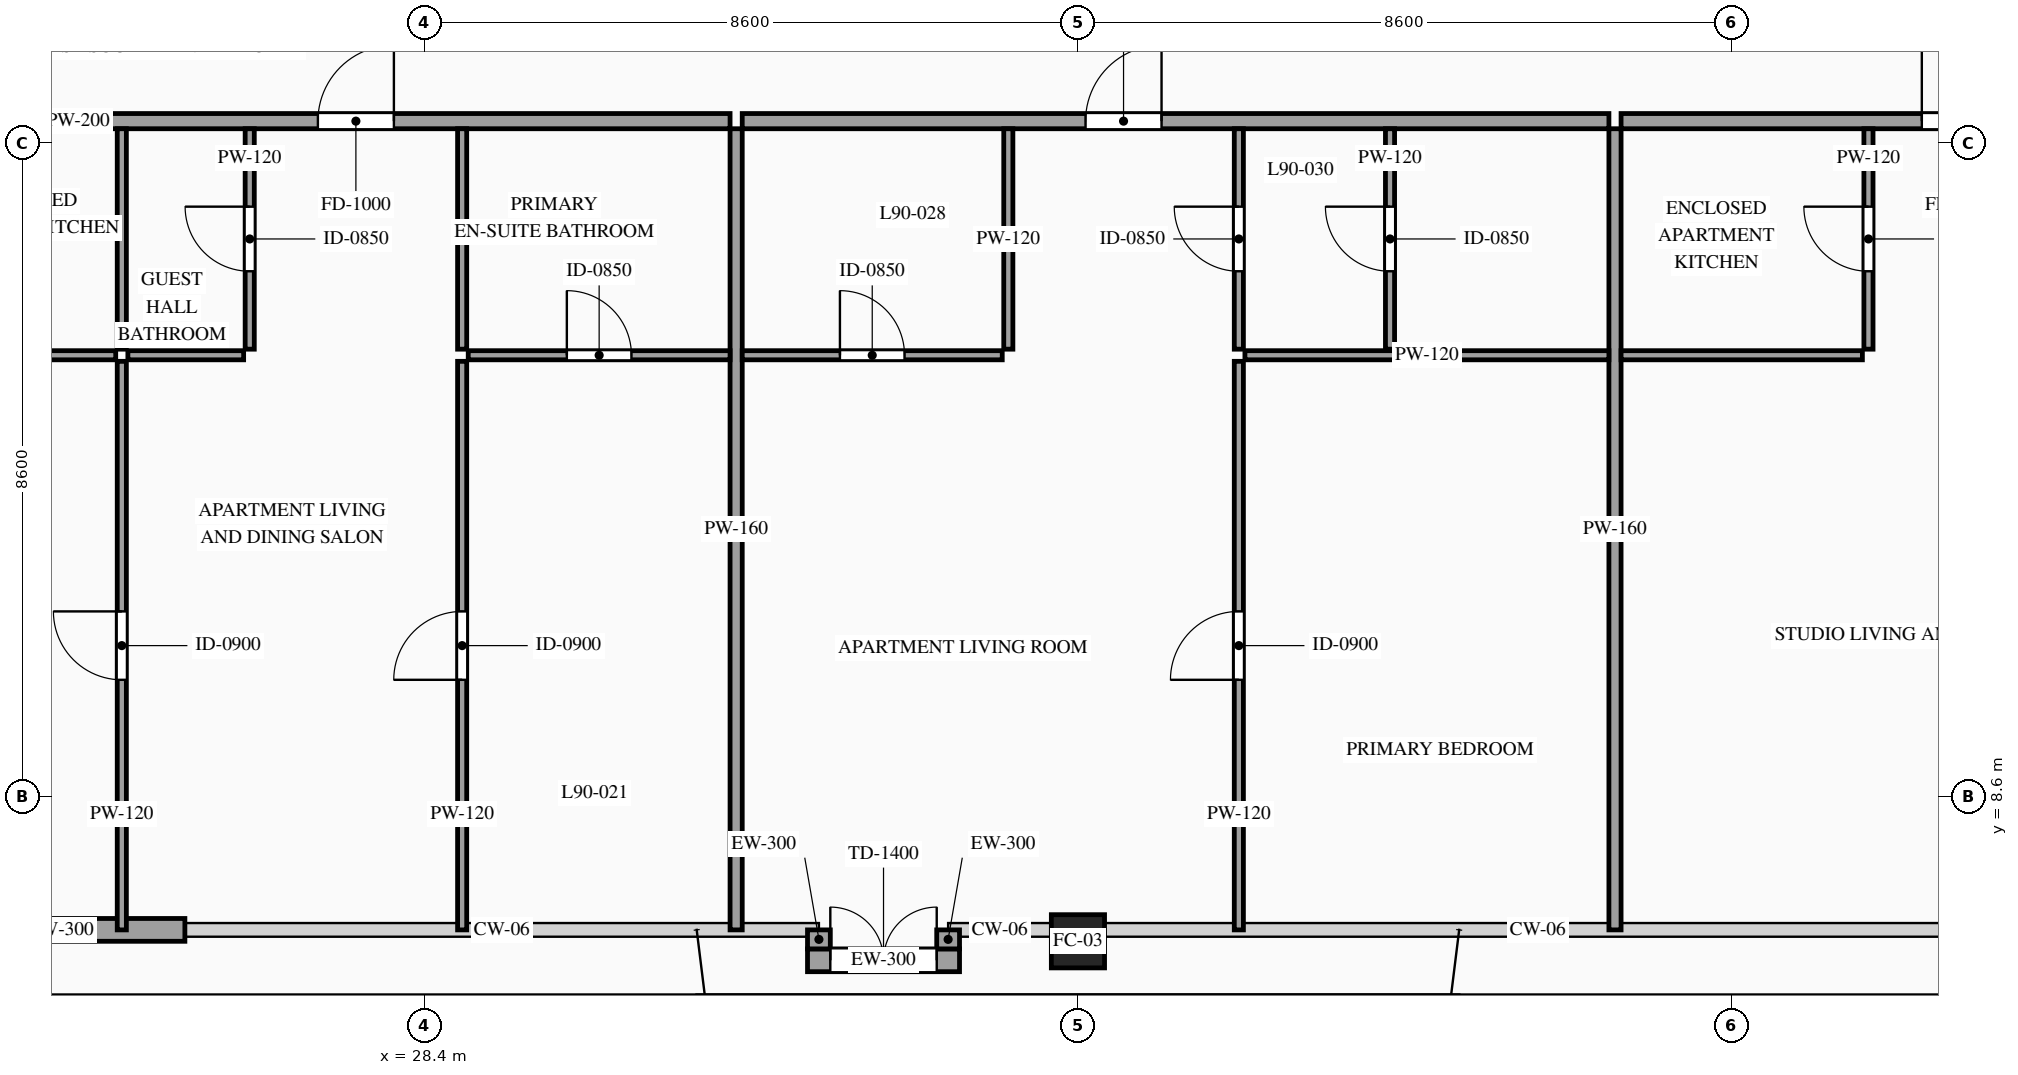
"""IFC4 building model, lengths in metres.
Left out: names, types, materials, properties, quantities, classifications, styles, units other than length and angle.
Written with IfcOpenShell. Run it as: python <this file> out.ifc"""

import sys

from ifc_helpers import new_model, si_unit, direction, frame, frame_2d, origin, origin_2d, place, context, subcontext, project, spatial, rectangle, hollow_rectangle, extrude, source, transform, mapped, element, fill, save


model = new_model("IFC4")
c1 = context("Model", 3, precision=1e-05, world=origin(), true_north=direction((0.0, 1.0)))
c2 = subcontext(c1, "Body", "Model", "MODEL_VIEW")
j1 = project(units=[si_unit("LENGTHUNIT", "METRE"), si_unit("PLANEANGLEUNIT", "RADIAN")], contexts=[c1])
p1 = place(None, origin())
s1 = spatial("IfcSite", under=j1, at=p1, CompositionType="ELEMENT")
p2 = place(p1, origin())
s2 = spatial("IfcBuilding", under=s1, at=p2, CompositionType="ELEMENT")
p3 = place(p2, frame((0.0, 0.0, 335.7)))
s3 = spatial("IfcBuildingStorey", under=s2, at=p3, CompositionType="ELEMENT", Elevation=335.7)
m1 = source(origin(), c2, "Body", "SweptSolid", [
    extrude(hollow_rectangle(XDim=0.7, YDim=0.7, WallThickness=0.032, at=origin_2d()), origin(), (0.0, 0.0, 1.0), 3.5),
])
p4 = place(p3, frame((37.0, 6.7, 0.0), z_axis=(0.0, 0.0, 1.0), x_axis=(1.0, 0.0, 0.0)))
e1 = element("IfcColumn", 1, at=p4, inside=s3, PredefinedType="COLUMN", context=c2, shape_type="MappedRepresentation", body=[
    mapped(m1, transform((0.0, 0.0, 0.0), scale=1.0)),
])
m2 = source(origin(), c2, "Body", "SweptSolid", [
    extrude(rectangle(XDim=3.25, YDim=0.3, at=frame_2d((1.625, 0.0))), origin(), (0.0, 0.0, 1.0), 2.865),
])
p5 = place(p3, frame((22.0, 6.85, 0.0), z_axis=(0.0, 0.0, 1.0), x_axis=(1.0, 0.0, 0.0)))
e2 = element("IfcWall", 2, at=p5, inside=s3, PredefinedType="SOLIDWALL", context=c2, shape_type="MappedRepresentation", body=[
    mapped(m2, transform((0.0, 0.0, 0.0), scale=1.0)),
])
p6 = place(p3, frame((33.442, 6.45, 0.0), z_axis=(0.0, 0.0, 1.0), x_axis=(1.0, 0.0, 0.0)))
e3 = element("IfcWall", 3, at=p6, inside=s3, PredefinedType="SOLIDWALL", context=c2, shape_type="SweptSolid", body=[
    extrude(rectangle(XDim=2.0, YDim=0.3, at=frame_2d((1.0, 0.0))), origin(), (0.0, 0.0, 1.0), 2.865),
])
p7 = place(p6, frame((0.3, 0.0, 0.0)))
e4 = element("IfcOpeningElement", 4, at=p7, cuts=e3, PredefinedType="OPENING", context=c2, shape_type="SweptSolid", body=[
    extrude(rectangle(XDim=1.4, YDim=2.3, at=frame_2d((0.7, 1.15))), frame((0.0, 0.165, 0.0), z_axis=(0.0, -1.0, 0.0), x_axis=(1.0, 0.0, 0.0)), (0.0, 0.0, 1.0), 0.33),
])
m3 = source(origin(), c2, "Body", "SweptSolid", [
    extrude(rectangle(XDim=0.25, YDim=0.3, at=frame_2d((0.125, 0.0))), origin(), (0.0, 0.0, 1.0), 3.26),
])
for number, where, z_axis, x_axis in (
    (5, (33.592, 6.85, 0.0), (0.0, 0.0, 1.0), (0.0, -1.0, 0.0)),
    (6, (35.292, 6.6, 0.0), (0.0, 0.0, 1.0), (0.0, 1.0, 0.0)),
):
    element("IfcWall", number, at=place(p3, frame(where, z_axis=z_axis, x_axis=x_axis)), inside=s3, PredefinedType="SOLIDWALL", context=c2, shape_type="MappedRepresentation", body=[
        mapped(m3, transform((0.0, 0.0, 0.0), scale=1.0)),
    ])
p8 = place(p3, frame((20.94, 17.49, 0.0), z_axis=(0.0, 0.0, 1.0), x_axis=(1.0, 0.0, 0.0)))
e7 = element("IfcWall", 7, at=p8, inside=s3, PredefinedType="PARTITIONING", context=c2, shape_type="SweptSolid", body=[
    extrude(rectangle(XDim=11.483, YDim=0.2, at=frame_2d((5.742, 0.0))), origin(), (0.0, 0.0, 1.0), 3.26),
])
p9 = place(p8, frame((6.06, 0.0, 0.0)))
e8 = element("IfcOpeningElement", 8, at=p9, cuts=e7, PredefinedType="OPENING", context=c2, shape_type="SweptSolid", body=[
    extrude(rectangle(XDim=1.0, YDim=2.2, at=frame_2d((0.5, 1.1))), frame((0.0, 0.115, 0.0), z_axis=(0.0, -1.0, 0.0), x_axis=(1.0, 0.0, 0.0)), (0.0, 0.0, 1.0), 0.23),
])
m4 = source(origin(), c2, "Body", "SweptSolid", [
    extrude(rectangle(XDim=10.54, YDim=0.16, at=frame_2d((5.27, 0.0))), origin(), (0.0, 0.0, 1.0), 3.26),
])
p10 = place(p3, frame((32.503, 6.85, 0.0), z_axis=(0.0, 0.0, 1.0), x_axis=(0.0, 1.0, 0.0)))
e9 = element("IfcWall", 9, at=p10, inside=s3, PredefinedType="PARTITIONING", context=c2, shape_type="MappedRepresentation", body=[
    mapped(m4, transform((0.0, 0.0, 0.0), scale=1.0)),
])
p11 = place(p3, frame((20.94, 14.41, 0.0), z_axis=(0.0, 0.0, 1.0), x_axis=(1.0, 0.0, 0.0)))
e10 = element("IfcWall", 10, at=p11, inside=s3, PredefinedType="PARTITIONING", context=c2, shape_type="SweptSolid", body=[
    extrude(rectangle(XDim=3.4, YDim=0.12, at=frame_2d((1.7, 0.0))), origin(), (0.0, 0.0, 1.0), 3.26),
])
p12 = place(p11, frame((1.275, 0.0, 0.0)))
e11 = element("IfcOpeningElement", 11, at=p12, cuts=e10, PredefinedType="OPENING", context=c2, shape_type="SweptSolid", body=[
    extrude(rectangle(XDim=0.85, YDim=2.1, at=frame_2d((0.425, 1.05))), frame((0.0, 0.075, 0.0), z_axis=(0.0, -1.0, 0.0), x_axis=(1.0, 0.0, 0.0)), (0.0, 0.0, 1.0), 0.15),
])
m5 = source(origin(), c2, "Body", "SweptSolid", [
    extrude(rectangle(XDim=2.9, YDim=0.12, at=frame_2d((1.45, 0.0))), origin(), (0.0, 0.0, 1.0), 3.26),
])
p13 = place(p3, frame((24.42, 14.49, 0.0), z_axis=(0.0, 0.0, 1.0), x_axis=(0.0, 1.0, 0.0)))
e12 = element("IfcWall", 12, at=p13, inside=s3, PredefinedType="PARTITIONING", context=c2, shape_type="MappedRepresentation", body=[
    mapped(m5, transform((0.0, 0.0, 0.0), scale=1.0)),
])
m6 = source(origin(), c2, "Body", "SweptSolid", [
    extrude(rectangle(XDim=1.523, YDim=0.12, at=frame_2d((0.761, 0.0))), origin(), (0.0, 0.0, 1.0), 3.26),
])
p14 = place(p3, frame((24.5, 14.41, 0.0), z_axis=(0.0, 0.0, 1.0), x_axis=(1.0, 0.0, 0.0)))
e13 = element("IfcWall", 13, at=p14, inside=s3, PredefinedType="PARTITIONING", context=c2, shape_type="MappedRepresentation", body=[
    mapped(m6, transform((0.0, 0.0, 0.0), scale=1.0)),
])
p15 = place(p3, frame((26.103, 14.49, 0.0), z_axis=(0.0, 0.0, 1.0), x_axis=(0.0, 1.0, 0.0)))
e14 = element("IfcWall", 14, at=p15, inside=s3, PredefinedType="PARTITIONING", context=c2, shape_type="SweptSolid", body=[
    extrude(rectangle(XDim=2.9, YDim=0.12, at=frame_2d((1.45, 0.0))), origin(), (0.0, 0.0, 1.0), 3.26),
])
p16 = place(p15, frame((1.025, 0.0, 0.0)))
e15 = element("IfcOpeningElement", 15, at=p16, cuts=e14, PredefinedType="OPENING", context=c2, shape_type="SweptSolid", body=[
    extrude(rectangle(XDim=0.85, YDim=2.1, at=frame_2d((0.425, 1.05))), frame((0.0, 0.075, 0.0), z_axis=(0.0, -1.0, 0.0), x_axis=(1.0, 0.0, 0.0)), (0.0, 0.0, 1.0), 0.15),
])
p17 = place(p3, frame((28.978, 14.41, 0.0), z_axis=(0.0, 0.0, 1.0), x_axis=(1.0, 0.0, 0.0)))
e16 = element("IfcWall", 16, at=p17, inside=s3, PredefinedType="PARTITIONING", context=c2, shape_type="SweptSolid", body=[
    extrude(rectangle(XDim=3.445, YDim=0.12, at=frame_2d((1.723, 0.0))), origin(), (0.0, 0.0, 1.0), 3.26),
])
p18 = place(p17, frame((1.298, 0.0, 0.0)))
e17 = element("IfcOpeningElement", 17, at=p18, cuts=e16, PredefinedType="OPENING", context=c2, shape_type="SweptSolid", body=[
    extrude(rectangle(XDim=0.85, YDim=2.1, at=frame_2d((0.425, 1.05))), frame((0.0, 0.075, 0.0), z_axis=(0.0, -1.0, 0.0), x_axis=(1.0, 0.0, 0.0)), (0.0, 0.0, 1.0), 0.15),
])
p19 = place(p3, frame((28.898, 14.49, 0.0), z_axis=(0.0, 0.0, 1.0), x_axis=(0.0, 1.0, 0.0)))
e18 = element("IfcWall", 18, at=p19, inside=s3, PredefinedType="PARTITIONING", context=c2, shape_type="MappedRepresentation", body=[
    mapped(m5, transform((0.0, 0.0, 0.0), scale=1.0)),
])
p20 = place(p3, frame((24.42, 6.85, 0.0), z_axis=(0.0, 0.0, 1.0), x_axis=(0.0, 1.0, 0.0)))
e19 = element("IfcWall", 19, at=p20, inside=s3, PredefinedType="PARTITIONING", context=c2, shape_type="SweptSolid", body=[
    extrude(rectangle(XDim=7.48, YDim=0.12, at=frame_2d((3.74, 0.0))), origin(), (0.0, 0.0, 1.0), 3.26),
])
p21 = place(p20, frame((3.29, 0.0, 0.0)))
e20 = element("IfcOpeningElement", 20, at=p21, cuts=e19, PredefinedType="OPENING", context=c2, shape_type="SweptSolid", body=[
    extrude(rectangle(XDim=0.9, YDim=2.15, at=frame_2d((0.45, 1.075))), frame((0.0, 0.075, 0.0), z_axis=(0.0, -1.0, 0.0), x_axis=(1.0, 0.0, 0.0)), (0.0, 0.0, 1.0), 0.15),
])
p22 = place(p3, frame((28.898, 6.85, 0.0), z_axis=(0.0, 0.0, 1.0), x_axis=(0.0, 1.0, 0.0)))
e21 = element("IfcWall", 21, at=p22, inside=s3, PredefinedType="PARTITIONING", context=c2, shape_type="SweptSolid", body=[
    extrude(rectangle(XDim=7.48, YDim=0.12, at=frame_2d((3.74, 0.0))), origin(), (0.0, 0.0, 1.0), 3.26),
])
p23 = place(p22, frame((3.29, 0.0, 0.0)))
e22 = element("IfcOpeningElement", 22, at=p23, cuts=e21, PredefinedType="OPENING", context=c2, shape_type="SweptSolid", body=[
    extrude(rectangle(XDim=0.9, YDim=2.15, at=frame_2d((0.45, 1.075))), frame((0.0, 0.075, 0.0), z_axis=(0.0, -1.0, 0.0), x_axis=(1.0, 0.0, 0.0)), (0.0, 0.0, 1.0), 0.15),
])
p24 = place(p3, frame((32.583, 17.49, 0.0), z_axis=(0.0, 0.0, 1.0), x_axis=(1.0, 0.0, 0.0)))
e23 = element("IfcWall", 23, at=p24, inside=s3, PredefinedType="PARTITIONING", context=c2, shape_type="SweptSolid", body=[
    extrude(rectangle(XDim=11.403, YDim=0.2, at=frame_2d((5.702, 0.0))), origin(), (0.0, 0.0, 1.0), 3.26),
])
p25 = place(p24, frame((4.517, 0.0, 0.0)))
e24 = element("IfcOpeningElement", 24, at=p25, cuts=e23, PredefinedType="OPENING", context=c2, shape_type="SweptSolid", body=[
    extrude(rectangle(XDim=1.0, YDim=2.2, at=frame_2d((0.5, 1.1))), frame((0.0, 0.115, 0.0), z_axis=(0.0, -1.0, 0.0), x_axis=(1.0, 0.0, 0.0)), (0.0, 0.0, 1.0), 0.23),
])
p26 = place(p3, frame((44.066, 6.85, 0.0), z_axis=(0.0, 0.0, 1.0), x_axis=(0.0, 1.0, 0.0)))
e25 = element("IfcWall", 25, at=p26, inside=s3, PredefinedType="PARTITIONING", context=c2, shape_type="MappedRepresentation", body=[
    mapped(m4, transform((0.0, 0.0, 0.0), scale=1.0)),
])
p27 = place(p3, frame((32.583, 14.41, 0.0), z_axis=(0.0, 0.0, 1.0), x_axis=(1.0, 0.0, 0.0)))
e26 = element("IfcWall", 26, at=p27, inside=s3, PredefinedType="PARTITIONING", context=c2, shape_type="SweptSolid", body=[
    extrude(rectangle(XDim=3.421, YDim=0.12, at=frame_2d((1.71, 0.0))), origin(), (0.0, 0.0, 1.0), 3.26),
])
p28 = place(p27, frame((1.285, 0.0, 0.0)))
e27 = element("IfcOpeningElement", 27, at=p28, cuts=e26, PredefinedType="OPENING", context=c2, shape_type="SweptSolid", body=[
    extrude(rectangle(XDim=0.85, YDim=2.1, at=frame_2d((0.425, 1.05))), frame((0.0, 0.075, 0.0), z_axis=(0.0, -1.0, 0.0), x_axis=(1.0, 0.0, 0.0)), (0.0, 0.0, 1.0), 0.15),
])
p29 = place(p3, frame((36.084, 14.49, 0.0), z_axis=(0.0, 0.0, 1.0), x_axis=(0.0, 1.0, 0.0)))
e28 = element("IfcWall", 28, at=p29, inside=s3, PredefinedType="PARTITIONING", context=c2, shape_type="MappedRepresentation", body=[
    mapped(m5, transform((0.0, 0.0, 0.0), scale=1.0)),
])
p30 = place(p3, frame((41.106, 14.49, 0.0), z_axis=(0.0, 0.0, 1.0), x_axis=(0.0, 1.0, 0.0)))
e29 = element("IfcWall", 29, at=p30, inside=s3, PredefinedType="PARTITIONING", context=c2, shape_type="SweptSolid", body=[
    extrude(rectangle(XDim=2.9, YDim=0.12, at=frame_2d((1.45, 0.0))), origin(), (0.0, 0.0, 1.0), 3.26),
])
p31 = place(p30, frame((1.025, 0.0, 0.0)))
e30 = element("IfcOpeningElement", 30, at=p31, cuts=e29, PredefinedType="OPENING", context=c2, shape_type="SweptSolid", body=[
    extrude(rectangle(XDim=0.85, YDim=2.1, at=frame_2d((0.425, 1.05))), frame((0.0, 0.075, 0.0), z_axis=(0.0, -1.0, 0.0), x_axis=(1.0, 0.0, 0.0)), (0.0, 0.0, 1.0), 0.15),
])
m7 = source(origin(), c2, "Body", "SweptSolid", [
    extrude(rectangle(XDim=4.789, YDim=0.12, at=frame_2d((2.395, 0.0))), origin(), (0.0, 0.0, 1.0), 3.26),
])
p32 = place(p3, frame((39.197, 14.41, 0.0), z_axis=(0.0, 0.0, 1.0), x_axis=(1.0, 0.0, 0.0)))
e31 = element("IfcWall", 31, at=p32, inside=s3, PredefinedType="PARTITIONING", context=c2, shape_type="MappedRepresentation", body=[
    mapped(m7, transform((0.0, 0.0, 0.0), scale=1.0)),
])
p33 = place(p3, frame((39.117, 6.85, 0.0), z_axis=(0.0, 0.0, 1.0), x_axis=(0.0, 1.0, 0.0)))
e32 = element("IfcWall", 32, at=p33, inside=s3, PredefinedType="PARTITIONING", context=c2, shape_type="SweptSolid", body=[
    extrude(rectangle(XDim=7.48, YDim=0.12, at=frame_2d((3.74, 0.0))), origin(), (0.0, 0.0, 1.0), 3.26),
])
p34 = place(p33, frame((3.29, 0.0, 0.0)))
e33 = element("IfcOpeningElement", 33, at=p34, cuts=e32, PredefinedType="OPENING", context=c2, shape_type="SweptSolid", body=[
    extrude(rectangle(XDim=0.9, YDim=2.15, at=frame_2d((0.45, 1.075))), frame((0.0, 0.075, 0.0), z_axis=(0.0, -1.0, 0.0), x_axis=(1.0, 0.0, 0.0)), (0.0, 0.0, 1.0), 0.15),
])
p35 = place(p3, frame((39.117, 14.49, 0.0), z_axis=(0.0, 0.0, 1.0), x_axis=(0.0, 1.0, 0.0)))
e34 = element("IfcWall", 34, at=p35, inside=s3, PredefinedType="PARTITIONING", context=c2, shape_type="SweptSolid", body=[
    extrude(rectangle(XDim=2.9, YDim=0.12, at=frame_2d((1.45, 0.0))), origin(), (0.0, 0.0, 1.0), 3.26),
])
p36 = place(p35, frame((1.025, 0.0, 0.0)))
e35 = element("IfcOpeningElement", 35, at=p36, cuts=e34, PredefinedType="OPENING", context=c2, shape_type="SweptSolid", body=[
    extrude(rectangle(XDim=0.85, YDim=2.1, at=frame_2d((0.425, 1.05))), frame((0.0, 0.075, 0.0), z_axis=(0.0, -1.0, 0.0), x_axis=(1.0, 0.0, 0.0)), (0.0, 0.0, 1.0), 0.15),
])
p37 = place(p3, frame((44.146, 17.49, 0.0), z_axis=(0.0, 0.0, 1.0), x_axis=(1.0, 0.0, 0.0)))
e36 = element("IfcWall", 36, at=p37, inside=s3, PredefinedType="PARTITIONING", context=c2, shape_type="SweptSolid", body=[
    extrude(rectangle(XDim=8.914, YDim=0.2, at=frame_2d((4.457, 0.0))), origin(), (0.0, 0.0, 1.0), 3.26),
])
p38 = place(p37, frame((3.957, 0.0, 0.0)))
e37 = element("IfcOpeningElement", 37, at=p38, cuts=e36, PredefinedType="OPENING", context=c2, shape_type="SweptSolid", body=[
    extrude(rectangle(XDim=1.0, YDim=2.2, at=frame_2d((0.5, 1.1))), frame((0.0, 0.115, 0.0), z_axis=(0.0, -1.0, 0.0), x_axis=(1.0, 0.0, 0.0)), (0.0, 0.0, 1.0), 0.23),
])
m8 = source(origin(), c2, "Body", "SweptSolid", [
    extrude(rectangle(XDim=3.175, YDim=0.12, at=frame_2d((1.587, 0.0))), origin(), (0.0, 0.0, 1.0), 3.26),
])
p39 = place(p3, frame((44.146, 14.41, 0.0), z_axis=(0.0, 0.0, 1.0), x_axis=(1.0, 0.0, 0.0)))
e38 = element("IfcWall", 38, at=p39, inside=s3, PredefinedType="PARTITIONING", context=c2, shape_type="MappedRepresentation", body=[
    mapped(m8, transform((0.0, 0.0, 0.0), scale=1.0)),
])
p40 = place(p3, frame((47.401, 14.49, 0.0), z_axis=(0.0, 0.0, 1.0), x_axis=(0.0, 1.0, 0.0)))
e39 = element("IfcWall", 39, at=p40, inside=s3, PredefinedType="PARTITIONING", context=c2, shape_type="SweptSolid", body=[
    extrude(rectangle(XDim=2.9, YDim=0.12, at=frame_2d((1.45, 0.0))), origin(), (0.0, 0.0, 1.0), 3.26),
])
p41 = place(p40, frame((1.025, 0.0, 0.0)))
e40 = element("IfcOpeningElement", 40, at=p41, cuts=e39, PredefinedType="OPENING", context=c2, shape_type="SweptSolid", body=[
    extrude(rectangle(XDim=0.85, YDim=2.1, at=frame_2d((0.425, 1.05))), frame((0.0, 0.075, 0.0), z_axis=(0.0, -1.0, 0.0), x_axis=(1.0, 0.0, 0.0)), (0.0, 0.0, 1.0), 0.15),
])
m9 = source(origin(), c2, "Body", "SweptSolid", [
    extrude(rectangle(XDim=1.4, YDim=2.3, at=frame_2d((0.7, 1.15))), frame((0.0, 0.025, 0.0), z_axis=(0.0, -1.0, 0.0), x_axis=(1.0, 0.0, 0.0)), (0.0, 0.0, 1.0), 0.05),
])
p42 = place(p7, origin())
e41 = element("IfcDoor", 41, at=p42, inside=s3, OperationType="DOUBLE_DOOR_SINGLE_SWING", PredefinedType="DOOR", context=c2, shape_type="MappedRepresentation", body=[
    mapped(m9, transform((0.0, 0.0, 0.0), scale=1.0)),
])
fill(e4, e41)
m10 = source(origin(), c2, "Body", "SweptSolid", [
    extrude(rectangle(XDim=1.0, YDim=2.2, at=frame_2d((0.5, 1.1))), frame((0.0, 0.025, 0.0), z_axis=(0.0, -1.0, 0.0), x_axis=(1.0, 0.0, 0.0)), (0.0, 0.0, 1.0), 0.05),
])
p43 = place(p9, origin())
e42 = element("IfcDoor", 42, at=p43, inside=s3, OperationType="SINGLE_SWING_RIGHT", PredefinedType="DOOR", context=c2, shape_type="MappedRepresentation", body=[
    mapped(m10, transform((0.0, 0.0, 0.0), scale=1.0)),
])
fill(e8, e42)
m11 = source(origin(), c2, "Body", "SweptSolid", [
    extrude(rectangle(XDim=0.85, YDim=2.1, at=frame_2d((0.425, 1.05))), frame((0.0, 0.025, 0.0), z_axis=(0.0, -1.0, 0.0), x_axis=(1.0, 0.0, 0.0)), (0.0, 0.0, 1.0), 0.05),
])
p44 = place(p16, origin())
e43 = element("IfcDoor", 43, at=p44, inside=s3, OperationType="SINGLE_SWING_RIGHT", PredefinedType="DOOR", context=c2, shape_type="MappedRepresentation", body=[
    mapped(m11, transform((0.0, 0.0, 0.0), scale=1.0)),
])
fill(e15, e43)
p45 = place(p18, origin())
e44 = element("IfcDoor", 44, at=p45, inside=s3, OperationType="SINGLE_SWING_LEFT", PredefinedType="DOOR", context=c2, shape_type="MappedRepresentation", body=[
    mapped(m11, transform((0.0, 0.0, 0.0), scale=1.0)),
])
fill(e17, e44)
m12 = source(origin(), c2, "Body", "SweptSolid", [
    extrude(rectangle(XDim=0.9, YDim=2.15, at=frame_2d((0.45, 1.075))), frame((0.0, 0.025, 0.0), z_axis=(0.0, -1.0, 0.0), x_axis=(1.0, 0.0, 0.0)), (0.0, 0.0, 1.0), 0.05),
])
p46 = place(p21, origin())
e45 = element("IfcDoor", 45, at=p46, inside=s3, OperationType="SINGLE_SWING_RIGHT", PredefinedType="DOOR", context=c2, shape_type="MappedRepresentation", body=[
    mapped(m12, transform((0.0, 0.0, 0.0), scale=1.0)),
])
fill(e20, e45)
p47 = place(p23, origin())
e46 = element("IfcDoor", 46, at=p47, inside=s3, OperationType="SINGLE_SWING_LEFT", PredefinedType="DOOR", context=c2, shape_type="MappedRepresentation", body=[
    mapped(m12, transform((0.0, 0.0, 0.0), scale=1.0)),
])
fill(e22, e46)
p48 = place(p25, origin())
e47 = element("IfcDoor", 47, at=p48, inside=s3, OperationType="SINGLE_SWING_RIGHT", PredefinedType="DOOR", context=c2, shape_type="MappedRepresentation", body=[
    mapped(m10, transform((0.0, 0.0, 0.0), scale=1.0)),
])
fill(e24, e47)
p49 = place(p28, origin())
e48 = element("IfcDoor", 48, at=p49, inside=s3, OperationType="SINGLE_SWING_LEFT", PredefinedType="DOOR", context=c2, shape_type="MappedRepresentation", body=[
    mapped(m11, transform((0.0, 0.0, 0.0), scale=1.0)),
])
fill(e27, e48)
p50 = place(p31, origin())
e49 = element("IfcDoor", 49, at=p50, inside=s3, OperationType="SINGLE_SWING_RIGHT", PredefinedType="DOOR", context=c2, shape_type="MappedRepresentation", body=[
    mapped(m11, transform((0.0, 0.0, 0.0), scale=1.0)),
])
fill(e30, e49)
p51 = place(p34, origin())
e50 = element("IfcDoor", 50, at=p51, inside=s3, OperationType="SINGLE_SWING_LEFT", PredefinedType="DOOR", context=c2, shape_type="MappedRepresentation", body=[
    mapped(m12, transform((0.0, 0.0, 0.0), scale=1.0)),
])
fill(e33, e50)
p52 = place(p36, origin())
e51 = element("IfcDoor", 51, at=p52, inside=s3, OperationType="SINGLE_SWING_RIGHT", PredefinedType="DOOR", context=c2, shape_type="MappedRepresentation", body=[
    mapped(m11, transform((0.0, 0.0, 0.0), scale=1.0)),
])
fill(e35, e51)
p53 = place(p38, origin())
e52 = element("IfcDoor", 52, at=p53, inside=s3, OperationType="SINGLE_SWING_LEFT", PredefinedType="DOOR", context=c2, shape_type="MappedRepresentation", body=[
    mapped(m10, transform((0.0, 0.0, 0.0), scale=1.0)),
])
fill(e37, e52)
p54 = place(p41, origin())
e53 = element("IfcDoor", 53, at=p54, inside=s3, OperationType="SINGLE_SWING_RIGHT", PredefinedType="DOOR", context=c2, shape_type="MappedRepresentation", body=[
    mapped(m11, transform((0.0, 0.0, 0.0), scale=1.0)),
])
fill(e40, e53)
save(model, sys.argv[1])
